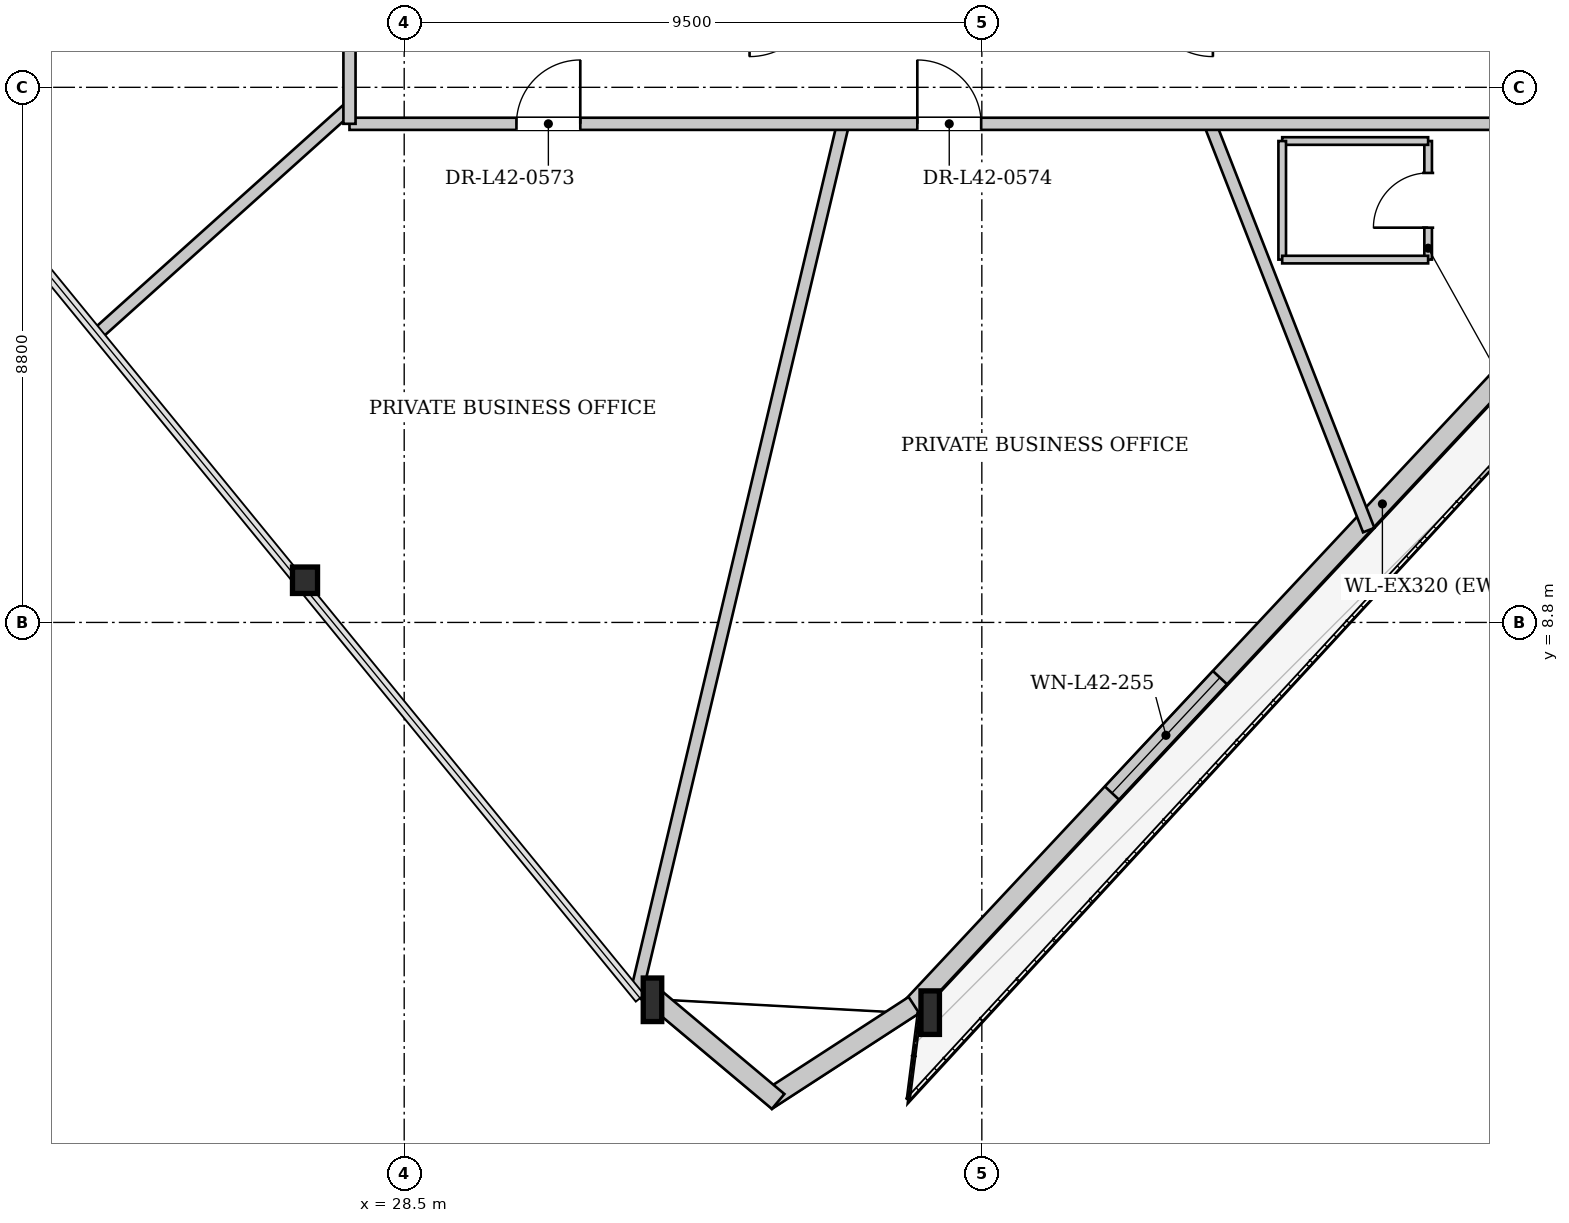
"""IFC4 building model, lengths in metres.
Left out: names, types, materials, properties, quantities, classifications, styles, units other than length and angle.
Written with IfcOpenShell. Run it as: python <this file> out.ifc"""

import sys

from ifc_helpers import new_model, si_unit, direction, frame, frame_2d, origin, origin_2d, place, context, subcontext, project, spatial, rectangle, i_section, extrude, source, transform, mapped, element, fill, save


model = new_model("IFC4")
c1 = context("Model", 3, precision=1e-05, world=origin(), true_north=direction((0.0, 1.0)))
c2 = subcontext(c1, "Body", "Model", "MODEL_VIEW")
j1 = project(units=[si_unit("LENGTHUNIT", "METRE"), si_unit("PLANEANGLEUNIT", "RADIAN")], contexts=[c1])
p1 = place(None, origin())
s1 = spatial("IfcSite", under=j1, at=p1, CompositionType="ELEMENT")
p2 = place(p1, origin())
s2 = spatial("IfcBuilding", under=s1, at=p2, CompositionType="ELEMENT")
p3 = place(p2, frame((0.0, 0.0, 160.8)))
s3 = spatial("IfcBuildingStorey", under=s2, at=p3, CompositionType="ELEMENT", Elevation=160.8)
m1 = source(origin(), c2, "Body", "SweptSolid", [
    extrude(i_section(OverallWidth=0.412, OverallDepth=0.435, WebThickness=0.031, FlangeThickness=0.05, at=origin_2d()), origin(), (0.0, 0.0, 1.0), 3.403),
])
p4 = place(p3, frame((26.706, 9.561, 0.0), z_axis=(0.09562503385, -0.03959866368, 0.994629478115), x_axis=(0.382596654669, 0.923915472235, 0.0)))
e1 = element("IfcColumn", 1, at=p4, inside=s3, PredefinedType="COLUMN", context=c2, shape_type="MappedRepresentation", body=[
    mapped(m1, transform((0.0, 0.0, 0.0), x_axis=(1.0, 0.0, 0.0), y_axis=(0.0, 1.0, 0.0), z_axis=(0.0, 0.0, 1.0), scale=1.0)),
])
m2 = source(origin(), c2, "Body", "SweptSolid", [
    extrude(i_section(OverallWidth=0.304, OverallDepth=0.716, WebThickness=0.021, FlangeThickness=0.04, at=origin_2d()), origin(), (0.0, 0.0, 1.0), 3.41),
])
p5 = place(p3, frame((32.379, 2.621, 0.0), z_axis=(0.120062274665, -0.015607379772, 0.99264367217), x_axis=(0.12890941525, 0.991656373276, 0.0)))
e2 = element("IfcColumn", 2, at=p5, inside=s3, PredefinedType="COLUMN", context=c2, shape_type="MappedRepresentation", body=[
    mapped(m2, transform((0.0, 0.0, 0.0), x_axis=(1.0, 0.0, 0.0), y_axis=(0.0, 1.0, 0.0), z_axis=(0.0, 0.0, 1.0), scale=1.0)),
])
m3 = source(origin(), c2, "Body", "SweptSolid", [
    extrude(i_section(OverallWidth=0.304, OverallDepth=0.716, WebThickness=0.021, FlangeThickness=0.04, at=origin_2d()), origin(), (0.0, 0.0, 1.0), 3.404),
])
p6 = place(p3, frame((36.97, 2.372, 0.0), z_axis=(0.106280411024, 0.006167419263, 0.994317070744), x_axis=(-0.057932229792, 0.998320518046, 0.0)))
e3 = element("IfcColumn", 3, at=p6, inside=s3, PredefinedType="COLUMN", context=c2, shape_type="MappedRepresentation", body=[
    mapped(m3, transform((0.0, 0.0, 0.0), x_axis=(1.0, 0.0, 0.0), y_axis=(0.0, 1.0, 0.0), z_axis=(0.0, 0.0, 1.0), scale=1.0)),
])
p7 = place(p3, frame((52.91, 19.645, 0.0), z_axis=(0.0, 0.0, 1.0), x_axis=(-0.683193045934, -0.730237811941, 0.0)))
e4 = element("IfcWall", 4, at=p7, inside=s3, PredefinedType="SOLIDWALL", context=c2, shape_type="SweptSolid", body=[
    extrude(rectangle(XDim=23.503, YDim=0.32, at=frame_2d((11.752, 0.0))), origin(), (0.0, 0.0, 1.0), 2.722),
])
p8 = place(p7, frame((6.771, 0.0, 0.0)))
e5 = element("IfcOpeningElement", 5, at=p8, cuts=e4, PredefinedType="OPENING", context=c2, shape_type="SweptSolid", body=[
    extrude(rectangle(XDim=1.5, YDim=2.3, at=frame_2d((0.75, 1.15))), frame((0.0, 0.17, 0.0), z_axis=(0.0, -1.0, 0.0), x_axis=(1.0, 0.0, 0.0)), (0.0, 0.0, 1.0), 0.34),
])
p9 = place(p7, frame((16.093, 0.0, 0.252)))
e6 = element("IfcOpeningElement", 6, at=p9, cuts=e4, PredefinedType="OPENING", context=c2, shape_type="SweptSolid", body=[
    extrude(rectangle(XDim=2.6, YDim=2.35, at=frame_2d((1.3, 1.175))), frame((0.0, 0.17, 0.0), z_axis=(0.0, -1.0, 0.0), x_axis=(1.0, 0.0, 0.0)), (0.0, 0.0, 1.0), 0.34),
])
p10 = place(p3, frame((36.883, 2.507, 0.0), z_axis=(0.0, 0.0, 1.0), x_axis=(-0.838789143282, -0.544456401479, 0.0)))
e7 = element("IfcWall", 7, at=p10, inside=s3, PredefinedType="SOLIDWALL", context=c2, shape_type="SweptSolid", body=[
    extrude(rectangle(XDim=2.888, YDim=0.32, at=frame_2d((1.444, 0.0))), origin(), (0.0, 0.0, 1.0), 2.722),
])
p11 = place(p3, frame((34.65, 0.923, 0.0), z_axis=(0.0, 0.0, 1.0), x_axis=(-0.765827147602, 0.643046483542, 0.0)))
e8 = element("IfcWall", 8, at=p11, inside=s3, PredefinedType="SOLIDWALL", context=c2, shape_type="SweptSolid", body=[
    extrude(rectangle(XDim=2.832, YDim=0.32, at=frame_2d((1.416, 0.0))), origin(), (0.0, 0.0, 1.0), 2.722),
])
p12 = place(p3, frame((27.6, 17.267, 0.0), z_axis=(0.0, 0.0, 1.0), x_axis=(-0.744269781278, -0.667879100344, 0.0)))
e9 = element("IfcWall", 9, at=p12, inside=s3, PredefinedType="PARTITIONING", context=c2, shape_type="SweptSolid", body=[
    extrude(rectangle(XDim=5.545, YDim=0.2, at=frame_2d((2.772, 0.0))), origin(), (0.0, 0.0, 1.0), 3.33),
])
p13 = place(p3, frame((35.717, 17.0, 0.0), z_axis=(0.0, 0.0, 1.0), x_axis=(-0.231323404058, -0.972876910372, 0.0)))
e10 = element("IfcWall", 10, at=p13, inside=s3, PredefinedType="PARTITIONING", context=c2, shape_type="SweptSolid", body=[
    extrude(rectangle(XDim=14.664, YDim=0.2, at=frame_2d((7.332, 0.0))), origin(), (0.0, 0.0, 1.0), 3.33),
])
p14 = place(p3, frame((41.752, 17.0, 0.0), z_axis=(0.0, 0.0, 1.0), x_axis=(0.36397970516, -0.931406878991, 0.0)))
e11 = element("IfcWall", 11, at=p14, inside=s3, PredefinedType="PARTITIONING", context=c2, shape_type="SweptSolid", body=[
    extrude(rectangle(XDim=7.174, YDim=0.2, at=frame_2d((3.587, 0.0))), origin(), (0.0, 0.0, 1.0), 3.33),
])
p15 = place(p3, frame((45.34, 14.767, 0.0), z_axis=(0.0, 0.0, 1.0), x_axis=(0.0, 1.0, 0.0)))
e12 = element("IfcWall", 12, at=p15, inside=s3, PredefinedType="PARTITIONING", context=c2, shape_type="SweptSolid", body=[
    extrude(rectangle(XDim=1.95, YDim=0.125, at=frame_2d((0.975, 0.0))), origin(), (0.0, 0.0, 1.0), 3.33),
])
p16 = place(p15, frame((0.525, 0.0, 0.0)))
e13 = element("IfcOpeningElement", 13, at=p16, cuts=e12, PredefinedType="OPENING", context=c2, shape_type="SweptSolid", body=[
    extrude(rectangle(XDim=0.9, YDim=2.1, at=frame_2d((0.45, 1.05))), frame((0.0, 0.073, 0.0), z_axis=(0.0, -1.0, 0.0), x_axis=(1.0, 0.0, 0.0)), (0.0, 0.0, 1.0), 0.145),
])
p17 = place(p3, frame((45.34, 16.717, 0.0), z_axis=(0.0, 0.0, 1.0), x_axis=(-1.0, 0.0, 0.0)))
e14 = element("IfcWall", 14, at=p17, inside=s3, PredefinedType="PARTITIONING", context=c2, shape_type="SweptSolid", body=[
    extrude(rectangle(XDim=2.4, YDim=0.125, at=frame_2d((1.2, 0.0))), origin(), (0.0, 0.0, 1.0), 3.33),
])
p18 = place(p3, frame((42.94, 16.717, 0.0), z_axis=(0.0, 0.0, 1.0), x_axis=(0.0, -1.0, 0.0)))
e15 = element("IfcWall", 15, at=p18, inside=s3, PredefinedType="PARTITIONING", context=c2, shape_type="SweptSolid", body=[
    extrude(rectangle(XDim=1.95, YDim=0.125, at=frame_2d((0.975, 0.0))), origin(), (0.0, 0.0, 1.0), 3.33),
])
p19 = place(p3, frame((42.94, 14.767, 0.0), z_axis=(0.0, 0.0, 1.0), x_axis=(1.0, 0.0, 0.0)))
e16 = element("IfcWall", 16, at=p19, inside=s3, PredefinedType="PARTITIONING", context=c2, shape_type="SweptSolid", body=[
    extrude(rectangle(XDim=2.4, YDim=0.125, at=frame_2d((1.2, 0.0))), origin(), (0.0, 0.0, 1.0), 3.33),
])
p20 = place(p3, frame((27.6, 17.0, 0.0), z_axis=(0.0, 0.0, 1.0), x_axis=(1.0, 0.0, 0.0)))
e17 = element("IfcWall", 17, at=p20, inside=s3, PredefinedType="PARTITIONING", context=c2, shape_type="SweptSolid", body=[
    extrude(rectangle(XDim=20.8, YDim=0.2, at=frame_2d((10.4, 0.0))), origin(), (0.0, 0.0, 1.0), 3.33),
])
p21 = place(p20, frame((2.746, 0.0, 0.0)))
e18 = element("IfcOpeningElement", 18, at=p21, cuts=e17, PredefinedType="OPENING", context=c2, shape_type="SweptSolid", body=[
    extrude(rectangle(XDim=1.05, YDim=2.2, at=frame_2d((0.525, 1.1))), frame((0.0, 0.11, 0.0), z_axis=(0.0, -1.0, 0.0), x_axis=(1.0, 0.0, 0.0)), (0.0, 0.0, 1.0), 0.22),
])
p22 = place(p20, frame((9.339, 0.0, 0.0)))
e19 = element("IfcOpeningElement", 19, at=p22, cuts=e17, PredefinedType="OPENING", context=c2, shape_type="SweptSolid", body=[
    extrude(rectangle(XDim=1.05, YDim=2.2, at=frame_2d((0.525, 1.1))), frame((0.0, 0.11, 0.0), z_axis=(0.0, -1.0, 0.0), x_axis=(1.0, 0.0, 0.0)), (0.0, 0.0, 1.0), 0.22),
])
p23 = place(p20, frame((19.091, 0.0, 0.0)))
e20 = element("IfcOpeningElement", 20, at=p23, cuts=e17, PredefinedType="OPENING", context=c2, shape_type="SweptSolid", body=[
    extrude(rectangle(XDim=1.05, YDim=2.2, at=frame_2d((0.525, 1.1))), frame((0.0, 0.11, 0.0), z_axis=(0.0, -1.0, 0.0), x_axis=(1.0, 0.0, 0.0)), (0.0, 0.0, 1.0), 0.22),
])
p24 = place(p3, frame((27.6, 17.0, 0.0), z_axis=(0.0, 0.0, 1.0), x_axis=(0.0, 1.0, 0.0)))
e21 = element("IfcWall", 21, at=p24, inside=s3, PredefinedType="PARTITIONING", context=c2, shape_type="SweptSolid", body=[
    extrude(rectangle(XDim=19.2, YDim=0.2, at=frame_2d((9.6, 0.0))), origin(), (0.0, 0.0, 1.0), 3.33),
])
p25 = place(p24, frame((17.85, 0.0, 0.0)))
e22 = element("IfcOpeningElement", 22, at=p25, cuts=e21, PredefinedType="OPENING", context=c2, shape_type="SweptSolid", body=[
    extrude(rectangle(XDim=1.05, YDim=2.2, at=frame_2d((0.525, 1.1))), frame((0.0, 0.11, 0.0), z_axis=(0.0, -1.0, 0.0), x_axis=(1.0, 0.0, 0.0)), (0.0, 0.0, 1.0), 0.22),
])
p26 = place(p24, frame((11.151, 0.0, 0.0)))
e23 = element("IfcOpeningElement", 23, at=p26, cuts=e21, PredefinedType="OPENING", context=c2, shape_type="SweptSolid", body=[
    extrude(rectangle(XDim=1.05, YDim=2.2, at=frame_2d((0.525, 1.1))), frame((0.0, 0.11, 0.0), z_axis=(0.0, -1.0, 0.0), x_axis=(1.0, 0.0, 0.0)), (0.0, 0.0, 1.0), 0.22),
])
p27 = place(p24, frame((3.147, 0.0, 0.0)))
e24 = element("IfcOpeningElement", 24, at=p27, cuts=e21, PredefinedType="OPENING", context=c2, shape_type="SweptSolid", body=[
    extrude(rectangle(XDim=1.05, YDim=2.2, at=frame_2d((0.525, 1.1))), frame((0.0, 0.11, 0.0), z_axis=(0.0, -1.0, 0.0), x_axis=(1.0, 0.0, 0.0)), (0.0, 0.0, 1.0), 0.22),
])
m4 = source(origin(), c2, "Body", "SweptSolid", [
    extrude(rectangle(XDim=2.6, YDim=2.35, at=frame_2d((1.3, 1.175))), frame((0.0, 0.03, 0.0), z_axis=(0.0, -1.0, 0.0), x_axis=(1.0, 0.0, 0.0)), (0.0, 0.0, 1.0), 0.06),
])
p28 = place(p9, origin())
e25 = element("IfcWindow", 25, at=p28, inside=s3, PartitioningType="SINGLE_PANEL", PredefinedType="WINDOW", context=c2, shape_type="MappedRepresentation", body=[
    mapped(m4, transform((0.0, 0.0, 0.0), x_axis=(1.0, 0.0, 0.0), y_axis=(0.0, 1.0, 0.0), z_axis=(0.0, 0.0, 1.0), scale=1.0)),
])
fill(e6, e25)
m5 = source(origin(), c2, "Body", "SweptSolid", [
    extrude(rectangle(XDim=0.9, YDim=2.1, at=frame_2d((0.45, 1.05))), frame((0.0, 0.025, 0.0), z_axis=(0.0, -1.0, 0.0), x_axis=(1.0, 0.0, 0.0)), (0.0, 0.0, 1.0), 0.05),
])
p29 = place(p16, origin())
e26 = element("IfcDoor", 26, at=p29, inside=s3, OperationType="SINGLE_SWING_LEFT", PredefinedType="DOOR", context=c2, shape_type="MappedRepresentation", body=[
    mapped(m5, transform((0.0, 0.0, 0.0), x_axis=(1.0, 0.0, 0.0), y_axis=(0.0, 1.0, 0.0), z_axis=(0.0, 0.0, 1.0), scale=1.0)),
])
fill(e13, e26)
m6 = source(origin(), c2, "Body", "SweptSolid", [
    extrude(rectangle(XDim=1.05, YDim=2.2, at=frame_2d((0.525, 1.1))), frame((0.0, 0.025, 0.0), z_axis=(0.0, -1.0, 0.0), x_axis=(1.0, 0.0, 0.0)), (0.0, 0.0, 1.0), 0.05),
])
p30 = place(p21, origin())
e27 = element("IfcDoor", 27, at=p30, inside=s3, OperationType="SINGLE_SWING_RIGHT", PredefinedType="DOOR", context=c2, shape_type="MappedRepresentation", body=[
    mapped(m6, transform((0.0, 0.0, 0.0), x_axis=(1.0, 0.0, 0.0), y_axis=(0.0, 1.0, 0.0), z_axis=(0.0, 0.0, 1.0), scale=1.0)),
])
fill(e18, e27)
p31 = place(p22, origin())
e28 = element("IfcDoor", 28, at=p31, inside=s3, OperationType="SINGLE_SWING_LEFT", PredefinedType="DOOR", context=c2, shape_type="MappedRepresentation", body=[
    mapped(m6, transform((0.0, 0.0, 0.0), x_axis=(1.0, 0.0, 0.0), y_axis=(0.0, 1.0, 0.0), z_axis=(0.0, 0.0, 1.0), scale=1.0)),
])
fill(e19, e28)
save(model, sys.argv[1])
